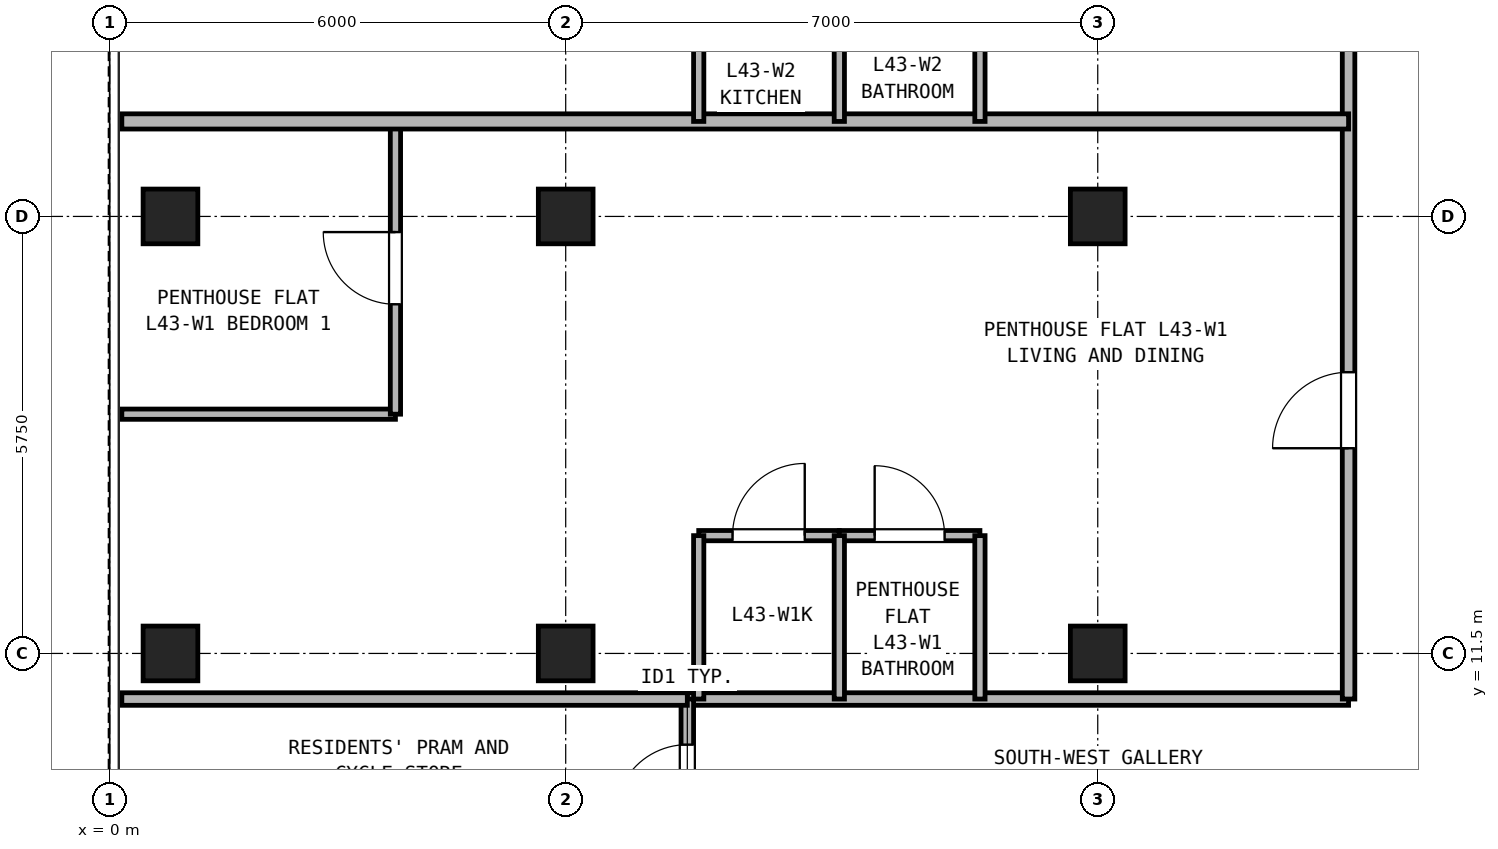
"""IFC4 building model, lengths in metres.
Left out: names, types, materials, properties, quantities, classifications, styles, units other than length and angle.
Written with IfcOpenShell. Run it as: python <this file> out.ifc"""

import sys

from ifc_helpers import new_model, si_unit, direction, frame, frame_2d, origin, origin_2d, place, context, subcontext, project, spatial, rectangle, hollow_rectangle, extrude, source, transform, mapped, element, fill, save


model = new_model("IFC4")
c1 = context("Model", 3, precision=1e-05, world=origin(), true_north=direction((0.0, 1.0)))
c2 = subcontext(c1, "Body", "Model", "MODEL_VIEW")
j1 = project(units=[si_unit("LENGTHUNIT", "METRE"), si_unit("PLANEANGLEUNIT", "RADIAN")], contexts=[c1])
p1 = place(None, origin())
s1 = spatial("IfcSite", under=j1, at=p1, CompositionType="ELEMENT")
p2 = place(p1, origin())
s2 = spatial("IfcBuilding", under=s1, at=p2, CompositionType="ELEMENT")
p3 = place(p2, frame((0.0, 0.0, 156.1)))
s3 = spatial("IfcBuildingStorey", under=s2, at=p3, CompositionType="ELEMENT", Elevation=156.1)
m1 = source(origin(), c2, "Body", "SweptSolid", [
    extrude(hollow_rectangle(XDim=0.72, YDim=0.72, WallThickness=0.04, at=origin_2d()), origin(), (0.0, 0.0, 1.0), 2.95),
])
for number, where, z_axis, x_axis in (
    (1, (0.8, 11.5, 0.0), (0.0, 0.0, 1.0), (1.0, 0.0, 0.0)),
    (2, (0.8, 17.25, 0.0), (0.0, 0.0, 1.0), (1.0, 0.0, 0.0)),
    (3, (6.0, 11.5, 0.0), (0.0, 0.0, 1.0), (1.0, 0.0, 0.0)),
    (4, (6.0, 17.25, 0.0), (0.0, 0.0, 1.0), (1.0, 0.0, 0.0)),
    (5, (13.0, 11.5, 0.0), (0.0, 0.0, 1.0), (1.0, 0.0, 0.0)),
    (6, (13.0, 17.25, 0.0), (0.0, 0.0, 1.0), (1.0, 0.0, 0.0)),
):
    element("IfcColumn", number, at=place(p3, frame(where, z_axis=z_axis, x_axis=x_axis)), inside=s3, PredefinedType="COLUMN", context=c2, shape_type="MappedRepresentation", body=[
        mapped(m1, transform((0.0, 0.0, 0.0), x_axis=(1.0, 0.0, 0.0), y_axis=(0.0, 1.0, 0.0), z_axis=(0.0, 0.0, 1.0), scale=1.0)),
    ])
p4 = place(p3, frame((7.6, 10.9, 0.0), z_axis=(0.0, 0.0, 1.0), x_axis=(1.0, 0.0, 0.0)))
e7 = element("IfcWall", 7, at=p4, inside=s3, PredefinedType="PARTITIONING", context=c2, shape_type="SweptSolid", body=[
    extrude(rectangle(XDim=8.7, YDim=0.165, at=frame_2d((4.35, 0.0))), origin(), (0.0, 0.0, 1.0), 2.95),
])
p5 = place(p3, frame((7.6, 8.9, 0.0), z_axis=(0.0, 0.0, 1.0), x_axis=(0.0, 1.0, 0.0)))
e8 = element("IfcWall", 8, at=p5, inside=s3, PredefinedType="PARTITIONING", context=c2, shape_type="SweptSolid", body=[
    extrude(rectangle(XDim=2.0, YDim=0.165, at=frame_2d((1.0, 0.0))), origin(), (0.0, 0.0, 1.0), 2.95),
])
p6 = place(p5, frame((0.45, 0.0, 0.0)))
e9 = element("IfcOpeningElement", 9, at=p6, cuts=e8, PredefinedType="OPENING", context=c2, shape_type="SweptSolid", body=[
    extrude(rectangle(XDim=0.95, YDim=2.15, at=frame_2d((0.475, 1.075))), frame((0.0, 0.093, 0.0), z_axis=(0.0, -1.0, 0.0), x_axis=(1.0, 0.0, 0.0)), (0.0, 0.0, 1.0), 0.185),
])
p7 = place(p3, frame((16.3, 10.9, 0.0), z_axis=(0.0, 0.0, 1.0), x_axis=(0.0, 1.0, 0.0)))
e10 = element("IfcWall", 10, at=p7, inside=s3, PredefinedType="PARTITIONING", context=c2, shape_type="SweptSolid", body=[
    extrude(rectangle(XDim=24.24, YDim=0.165, at=frame_2d((12.12, 0.0))), origin(), (0.0, 0.0, 1.0), 2.95),
])
p8 = place(p7, frame((3.3, 0.0, 0.0)))
e11 = element("IfcOpeningElement", 11, at=p8, cuts=e10, PredefinedType="OPENING", context=c2, shape_type="SweptSolid", body=[
    extrude(rectangle(XDim=1.0, YDim=2.15, at=frame_2d((0.5, 1.075))), frame((0.0, 0.093, 0.0), z_axis=(0.0, -1.0, 0.0), x_axis=(1.0, 0.0, 0.0)), (0.0, 0.0, 1.0), 0.185),
])
p9 = place(p7, frame((11.25, 0.0, 0.0)))
e12 = element("IfcOpeningElement", 12, at=p9, cuts=e10, PredefinedType="OPENING", context=c2, shape_type="SweptSolid", body=[
    extrude(rectangle(XDim=1.0, YDim=2.15, at=frame_2d((0.5, 1.075))), frame((0.0, 0.093, 0.0), z_axis=(0.0, -1.0, 0.0), x_axis=(1.0, 0.0, 0.0)), (0.0, 0.0, 1.0), 0.185),
])
p10 = place(p7, frame((17.2, 0.0, 0.0)))
e13 = element("IfcOpeningElement", 13, at=p10, cuts=e10, PredefinedType="OPENING", context=c2, shape_type="SweptSolid", body=[
    extrude(rectangle(XDim=1.0, YDim=2.15, at=frame_2d((0.5, 1.075))), frame((0.0, 0.093, 0.0), z_axis=(0.0, -1.0, 0.0), x_axis=(1.0, 0.0, 0.0)), (0.0, 0.0, 1.0), 0.185),
])
p11 = place(p3, frame((0.16, 10.9, 0.0), z_axis=(0.0, 0.0, 1.0), x_axis=(1.0, 0.0, 0.0)))
e14 = element("IfcWall", 14, at=p11, inside=s3, PredefinedType="PARTITIONING", context=c2, shape_type="SweptSolid", body=[
    extrude(rectangle(XDim=7.44, YDim=0.165, at=frame_2d((3.72, 0.0))), origin(), (0.0, 0.0, 1.0), 2.95),
])
p12 = place(p3, frame((7.75, 13.05, 0.0), z_axis=(0.0, 0.0, 1.0), x_axis=(1.0, 0.0, 0.0)))
e15 = element("IfcWall", 15, at=p12, inside=s3, PredefinedType="PARTITIONING", context=c2, shape_type="SweptSolid", body=[
    extrude(rectangle(XDim=1.85, YDim=0.135, at=frame_2d((0.925, 0.0))), origin(), (0.0, 0.0, 1.0), 2.95),
])
p13 = place(p12, frame((0.445, 0.0, 0.0)))
e16 = element("IfcOpeningElement", 16, at=p13, cuts=e15, PredefinedType="OPENING", context=c2, shape_type="SweptSolid", body=[
    extrude(rectangle(XDim=0.95, YDim=2.15, at=frame_2d((0.475, 1.075))), frame((0.0, 0.077, 0.0), z_axis=(0.0, -1.0, 0.0), x_axis=(1.0, 0.0, 0.0)), (0.0, 0.0, 1.0), 0.155),
])
p14 = place(p3, frame((9.6, 13.05, 0.0), z_axis=(0.0, 0.0, 1.0), x_axis=(1.0, 0.0, 0.0)))
e17 = element("IfcWall", 17, at=p14, inside=s3, PredefinedType="PARTITIONING", context=c2, shape_type="SweptSolid", body=[
    extrude(rectangle(XDim=1.85, YDim=0.135, at=frame_2d((0.925, 0.0))), origin(), (0.0, 0.0, 1.0), 2.95),
])
p15 = place(p14, frame((0.465, 0.0, 0.0)))
e18 = element("IfcOpeningElement", 18, at=p15, cuts=e17, PredefinedType="OPENING", context=c2, shape_type="SweptSolid", body=[
    extrude(rectangle(XDim=0.92, YDim=2.1, at=frame_2d((0.46, 1.05))), frame((0.0, 0.077, 0.0), z_axis=(0.0, -1.0, 0.0), x_axis=(1.0, 0.0, 0.0)), (0.0, 0.0, 1.0), 0.155),
])
for number, where, z_axis, x_axis in (
    (19, (7.75, 10.9, 0.0), (0.0, 0.0, 1.0), (0.0, 1.0, 0.0)),
    (20, (9.6, 10.9, 0.0), (0.0, 0.0, 1.0), (0.0, 1.0, 0.0)),
    (21, (11.45, 10.9, 0.0), (0.0, 0.0, 1.0), (0.0, 1.0, 0.0)),
):
    element("IfcWall", number, at=place(p3, frame(where, z_axis=z_axis, x_axis=x_axis)), inside=s3, PredefinedType="PARTITIONING", context=c2, shape_type="SweptSolid", body=[
        extrude(rectangle(XDim=2.15, YDim=0.135, at=frame_2d((1.075, 0.0))), origin(), (0.0, 0.0, 1.0), 2.95),
    ])
p16 = place(p3, frame((0.16, 14.648, 0.0), z_axis=(0.0, 0.0, 1.0), x_axis=(1.0, 0.0, 0.0)))
e22 = element("IfcWall", 22, at=p16, inside=s3, PredefinedType="PARTITIONING", context=c2, shape_type="SweptSolid", body=[
    extrude(rectangle(XDim=3.6, YDim=0.135, at=frame_2d((1.8, 0.0))), origin(), (0.0, 0.0, 1.0), 2.95),
])
p17 = place(p3, frame((3.76, 14.648, 0.0), z_axis=(0.0, 0.0, 1.0), x_axis=(0.0, 1.0, 0.0)))
e23 = element("IfcWall", 23, at=p17, inside=s3, PredefinedType="PARTITIONING", context=c2, shape_type="SweptSolid", body=[
    extrude(rectangle(XDim=3.852, YDim=0.135, at=frame_2d((1.926, 0.0))), origin(), (0.0, 0.0, 1.0), 2.95),
])
p18 = place(p17, frame((1.446, 0.0, 0.0)))
e24 = element("IfcOpeningElement", 24, at=p18, cuts=e23, PredefinedType="OPENING", context=c2, shape_type="SweptSolid", body=[
    extrude(rectangle(XDim=0.95, YDim=2.15, at=frame_2d((0.475, 1.075))), frame((0.0, 0.077, 0.0), z_axis=(0.0, -1.0, 0.0), x_axis=(1.0, 0.0, 0.0)), (0.0, 0.0, 1.0), 0.155),
])
p19 = place(p3, frame((0.16, 18.5, 0.0), z_axis=(0.0, 0.0, 1.0), x_axis=(1.0, 0.0, 0.0)))
e25 = element("IfcWall", 25, at=p19, inside=s3, PredefinedType="PARTITIONING", context=c2, shape_type="SweptSolid", body=[
    extrude(rectangle(XDim=16.14, YDim=0.2, at=frame_2d((8.07, 0.0))), origin(), (0.0, 0.0, 1.0), 2.95),
])
for number, where, z_axis, x_axis in (
    (26, (7.75, 18.5, 0.0), (0.0, 0.0, 1.0), (0.0, 1.0, 0.0)),
    (27, (9.6, 18.5, 0.0), (0.0, 0.0, 1.0), (0.0, 1.0, 0.0)),
    (28, (11.45, 18.5, 0.0), (0.0, 0.0, 1.0), (0.0, 1.0, 0.0)),
):
    element("IfcWall", number, at=place(p3, frame(where, z_axis=z_axis, x_axis=x_axis)), inside=s3, PredefinedType="PARTITIONING", context=c2, shape_type="SweptSolid", body=[
        extrude(rectangle(XDim=2.15, YDim=0.135, at=frame_2d((1.075, 0.0))), origin(), (0.0, 0.0, 1.0), 2.95),
    ])
p20 = place(p6, frame((0.95, 0.0, 0.0), z_axis=(0.0, 0.0, 1.0), x_axis=(-1.0, 0.0, 0.0)))
e29 = element("IfcDoor", 29, at=p20, inside=s3, OperationType="SINGLE_SWING_LEFT", PredefinedType="DOOR", context=c2, shape_type="SweptSolid", body=[
    extrude(rectangle(XDim=0.95, YDim=2.15, at=frame_2d((0.475, 1.075))), frame((0.0, 0.025, 0.0), z_axis=(0.0, -1.0, 0.0), x_axis=(1.0, 0.0, 0.0)), (0.0, 0.0, 1.0), 0.05),
])
fill(e9, e29)
p21 = place(p13, origin())
e30 = element("IfcDoor", 30, at=p21, inside=s3, OperationType="SINGLE_SWING_RIGHT", PredefinedType="DOOR", context=c2, shape_type="SweptSolid", body=[
    extrude(rectangle(XDim=0.95, YDim=2.15, at=frame_2d((0.475, 1.075))), frame((0.0, 0.025, 0.0), z_axis=(0.0, -1.0, 0.0), x_axis=(1.0, 0.0, 0.0)), (0.0, 0.0, 1.0), 0.05),
])
fill(e16, e30)
p22 = place(p15, origin())
e31 = element("IfcDoor", 31, at=p22, inside=s3, OperationType="SINGLE_SWING_LEFT", PredefinedType="DOOR", context=c2, shape_type="SweptSolid", body=[
    extrude(rectangle(XDim=0.92, YDim=2.1, at=frame_2d((0.46, 1.05))), frame((0.0, 0.025, 0.0), z_axis=(0.0, -1.0, 0.0), x_axis=(1.0, 0.0, 0.0)), (0.0, 0.0, 1.0), 0.05),
])
fill(e18, e31)
p23 = place(p18, origin())
e32 = element("IfcDoor", 32, at=p23, inside=s3, OperationType="SINGLE_SWING_RIGHT", PredefinedType="DOOR", context=c2, shape_type="SweptSolid", body=[
    extrude(rectangle(XDim=0.95, YDim=2.15, at=frame_2d((0.475, 1.075))), frame((0.0, 0.025, 0.0), z_axis=(0.0, -1.0, 0.0), x_axis=(1.0, 0.0, 0.0)), (0.0, 0.0, 1.0), 0.05),
])
fill(e24, e32)
p24 = place(p8, origin())
e33 = element("IfcDoor", 33, at=p24, inside=s3, OperationType="SINGLE_SWING_LEFT", PredefinedType="DOOR", context=c2, shape_type="SweptSolid", body=[
    extrude(rectangle(XDim=1.0, YDim=2.15, at=frame_2d((0.5, 1.075))), frame((0.0, 0.025, 0.0), z_axis=(0.0, -1.0, 0.0), x_axis=(1.0, 0.0, 0.0)), (0.0, 0.0, 1.0), 0.05),
])
fill(e11, e33)
save(model, sys.argv[1])
